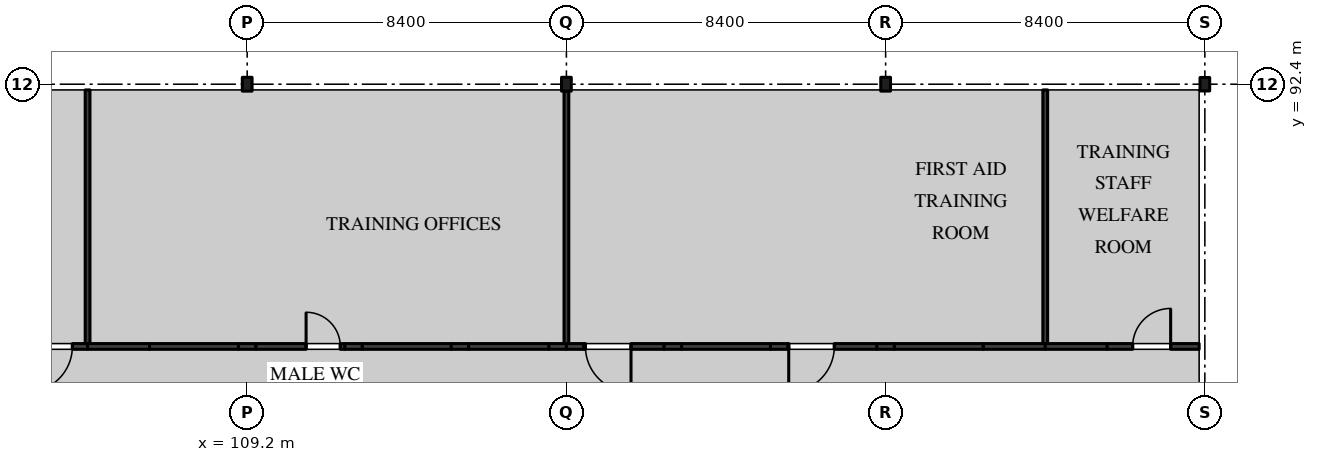
"""IFC4 building model, lengths in metres.
Left out: names, types, materials, properties, quantities, classifications, styles, units other than length and angle.
Written with IfcOpenShell. Run it as: python <this file> out.ifc"""

import sys

from ifc_helpers import new_model, si_unit, direction, frame, frame_2d, origin, origin_2d, place, context, subcontext, project, spatial, rectangle, i_section, extrude, element, fill, save


model = new_model("IFC4")
c1 = context("Model", 3, precision=1e-05, world=origin(), true_north=direction((0.0, 1.0)))
c2 = subcontext(c1, "Body", "Model", "MODEL_VIEW")
j1 = project(units=[si_unit("LENGTHUNIT", "METRE"), si_unit("PLANEANGLEUNIT", "RADIAN")], contexts=[c1])
p1 = place(None, origin())
s1 = spatial("IfcSite", under=j1, at=p1, CompositionType="ELEMENT")
p2 = place(p1, origin())
s2 = spatial("IfcBuilding", under=s1, at=p2, CompositionType="ELEMENT")
p3 = place(p2, frame((0.0, 0.0, 18.9)))
s3 = spatial("IfcBuildingStorey", under=s2, at=p3, CompositionType="ELEMENT", Elevation=18.9)
for number, where, z_axis, x_axis in (
    (1, (109.2, 92.4, 0.0), (0.0, 0.0, 1.0), (1.0, 0.0, 0.0)),
    (2, (117.6, 92.4, 0.0), (0.0, 0.0, 1.0), (1.0, 0.0, 0.0)),
    (3, (126.0, 92.4, 0.0), (0.0, 0.0, 1.0), (1.0, 0.0, 0.0)),
):
    element("IfcColumn", number, at=place(p3, frame(where, z_axis=z_axis, x_axis=x_axis)), inside=s3, PredefinedType="COLUMN", context=c2, shape_type="SweptSolid", body=[
        extrude(i_section(OverallWidth=0.257, OverallDepth=0.363, WebThickness=0.013, FlangeThickness=0.022, FilletRadius=0.015, at=origin_2d()), origin(), (0.0, 0.0, 1.0), 4.37),
    ])
p4 = place(p3, frame((134.4, 92.4, 0.0), z_axis=(0.0, 0.0, 1.0), x_axis=(1.0, 0.0, 0.0)))
e4 = element("IfcColumn", 4, at=p4, inside=s3, PredefinedType="COLUMN", context=c2, shape_type="SweptSolid", body=[
    extrude(i_section(OverallWidth=0.254, OverallDepth=0.353, WebThickness=0.01, FlangeThickness=0.016, FilletRadius=0.015, at=origin_2d()), origin(), (0.0, 0.0, 1.0), 4.37),
])
p5 = place(p3, frame((105.0, 85.575, 0.0), z_axis=(0.0, 0.0, 1.0), x_axis=(0.0, 1.0, 0.0)))
e5 = element("IfcWall", 5, at=p5, inside=s3, PredefinedType="PARTITIONING", context=c2, shape_type="SweptSolid", body=[
    extrude(rectangle(XDim=6.675, YDim=0.125, at=frame_2d((3.337, 0.0))), origin(), (0.0, 0.0, 1.0), 4.37),
])
p6 = place(p3, frame((103.37, 85.5, 0.0), z_axis=(0.0, 0.0, 1.0), x_axis=(1.0, 0.0, 0.0)))
e6 = element("IfcWall", 6, at=p6, inside=s3, PredefinedType="PARTITIONING", context=c2, shape_type="SweptSolid", body=[
    extrude(rectangle(XDim=1.63, YDim=0.15, at=frame_2d((0.815, 0.0))), origin(), (0.0, 0.0, 1.0), 3.946),
])
p7 = place(p6, frame((0.03, 0.0, 0.0)))
e7 = element("IfcOpeningElement", 7, at=p7, cuts=e6, PredefinedType="OPENING", context=c2, shape_type="SweptSolid", body=[
    extrude(rectangle(XDim=1.2, YDim=2.4, at=frame_2d((0.6, 1.2))), frame((0.0, 0.085, 0.0), z_axis=(0.0, -1.0, 0.0), x_axis=(1.0, 0.0, 0.0)), (0.0, 0.0, 1.0), 0.17),
])
p8 = place(p3, frame((117.6, 85.575, 0.0), z_axis=(0.0, 0.0, 1.0), x_axis=(0.0, 1.0, 0.0)))
e8 = element("IfcWall", 8, at=p8, inside=s3, PredefinedType="PARTITIONING", context=c2, shape_type="SweptSolid", body=[
    extrude(rectangle(XDim=6.644, YDim=0.125, at=frame_2d((3.322, 0.0))), origin(), (0.0, 0.0, 1.0), 3.819),
])
p9 = place(p3, frame((105.0, 85.5, 0.0), z_axis=(0.0, 0.0, 1.0), x_axis=(1.0, 0.0, 0.0)))
e9 = element("IfcWall", 9, at=p9, inside=s3, PredefinedType="PARTITIONING", context=c2, shape_type="SweptSolid", body=[
    extrude(rectangle(XDim=1.63, YDim=0.15, at=frame_2d((0.815, 0.0))), origin(), (0.0, 0.0, 1.0), 3.946),
])
p10 = place(p3, frame((106.63, 85.5, 0.0), z_axis=(0.0, 0.0, 1.0), x_axis=(1.0, 0.0, 0.0)))
e10 = element("IfcWall", 10, at=p10, inside=s3, PredefinedType="PARTITIONING", context=c2, shape_type="SweptSolid", body=[
    extrude(rectangle(XDim=2.34, YDim=0.15, at=frame_2d((1.17, 0.0))), origin(), (0.0, 0.0, 1.0), 4.37),
])
p11 = place(p3, frame((108.97, 85.5, 0.0), z_axis=(0.0, 0.0, 1.0), x_axis=(1.0, 0.0, 0.0)))
e11 = element("IfcWall", 11, at=p11, inside=s3, PredefinedType="PARTITIONING", context=c2, shape_type="SweptSolid", body=[
    extrude(rectangle(XDim=0.46, YDim=0.15, at=frame_2d((0.23, 0.0))), origin(), (0.0, 0.0, 1.0), 3.819),
])
p12 = place(p3, frame((109.43, 85.5, 0.0), z_axis=(0.0, 0.0, 1.0), x_axis=(1.0, 0.0, 0.0)))
e12 = element("IfcWall", 12, at=p12, inside=s3, PredefinedType="PARTITIONING", context=c2, shape_type="SweptSolid", body=[
    extrude(rectangle(XDim=2.34, YDim=0.15, at=frame_2d((1.17, 0.0))), origin(), (0.0, 0.0, 1.0), 4.37),
])
p13 = place(p12, frame((1.32, 0.0, 0.0)))
e13 = element("IfcOpeningElement", 13, at=p13, cuts=e12, PredefinedType="OPENING", context=c2, shape_type="SweptSolid", body=[
    extrude(rectangle(XDim=0.9, YDim=2.1, at=frame_2d((0.45, 1.05))), frame((0.0, 0.085, 0.0), z_axis=(0.0, -1.0, 0.0), x_axis=(1.0, 0.0, 0.0)), (0.0, 0.0, 1.0), 0.17),
])
p14 = place(p3, frame((111.77, 85.5, 0.0), z_axis=(0.0, 0.0, 1.0), x_axis=(1.0, 0.0, 0.0)))
e14 = element("IfcWall", 14, at=p14, inside=s3, PredefinedType="PARTITIONING", context=c2, shape_type="SweptSolid", body=[
    extrude(rectangle(XDim=0.46, YDim=0.15, at=frame_2d((0.23, 0.0))), origin(), (0.0, 0.0, 1.0), 3.946),
])
p15 = place(p3, frame((112.23, 85.5, 0.0), z_axis=(0.0, 0.0, 1.0), x_axis=(1.0, 0.0, 0.0)))
e15 = element("IfcWall", 15, at=p15, inside=s3, PredefinedType="PARTITIONING", context=c2, shape_type="SweptSolid", body=[
    extrude(rectangle(XDim=2.34, YDim=0.15, at=frame_2d((1.17, 0.0))), origin(), (0.0, 0.0, 1.0), 4.37),
])
p16 = place(p3, frame((114.57, 85.5, 0.0), z_axis=(0.0, 0.0, 1.0), x_axis=(1.0, 0.0, 0.0)))
e16 = element("IfcWall", 16, at=p16, inside=s3, PredefinedType="PARTITIONING", context=c2, shape_type="SweptSolid", body=[
    extrude(rectangle(XDim=0.46, YDim=0.15, at=frame_2d((0.23, 0.0))), origin(), (0.0, 0.0, 1.0), 3.946),
])
p17 = place(p3, frame((115.03, 85.5, 0.0), z_axis=(0.0, 0.0, 1.0), x_axis=(1.0, 0.0, 0.0)))
e17 = element("IfcWall", 17, at=p17, inside=s3, PredefinedType="PARTITIONING", context=c2, shape_type="SweptSolid", body=[
    extrude(rectangle(XDim=2.11, YDim=0.15, at=frame_2d((1.055, 0.0))), origin(), (0.0, 0.0, 1.0), 4.37),
])
p18 = place(p3, frame((117.14, 85.5, 0.0), z_axis=(0.0, 0.0, 1.0), x_axis=(1.0, 0.0, 0.0)))
e18 = element("IfcWall", 18, at=p18, inside=s3, PredefinedType="PARTITIONING", context=c2, shape_type="SweptSolid", body=[
    extrude(rectangle(XDim=0.46, YDim=0.15, at=frame_2d((0.23, 0.0))), origin(), (0.0, 0.0, 1.0), 3.819),
])
p19 = place(p3, frame((130.2, 85.575, 0.0), z_axis=(0.0, 0.0, 1.0), x_axis=(0.0, 1.0, 0.0)))
e19 = element("IfcWall", 19, at=p19, inside=s3, PredefinedType="PARTITIONING", context=c2, shape_type="SweptSolid", body=[
    extrude(rectangle(XDim=6.675, YDim=0.125, at=frame_2d((3.337, 0.0))), origin(), (0.0, 0.0, 1.0), 4.37),
])
p20 = place(p3, frame((117.6, 85.5, 0.0), z_axis=(0.0, 0.0, 1.0), x_axis=(1.0, 0.0, 0.0)))
e20 = element("IfcWall", 20, at=p20, inside=s3, PredefinedType="PARTITIONING", context=c2, shape_type="SweptSolid", body=[
    extrude(rectangle(XDim=0.46, YDim=0.15, at=frame_2d((0.23, 0.0))), origin(), (0.0, 0.0, 1.0), 3.819),
])
p21 = place(p3, frame((118.06, 85.5, 0.0), z_axis=(0.0, 0.0, 1.0), x_axis=(1.0, 0.0, 0.0)))
e21 = element("IfcWall", 21, at=p21, inside=s3, PredefinedType="PARTITIONING", context=c2, shape_type="SweptSolid", body=[
    extrude(rectangle(XDim=2.11, YDim=0.15, at=frame_2d((1.055, 0.0))), origin(), (0.0, 0.0, 1.0), 4.37),
])
p22 = place(p21, frame((0.04, 0.0, 0.0)))
e22 = element("IfcOpeningElement", 22, at=p22, cuts=e21, PredefinedType="OPENING", context=c2, shape_type="SweptSolid", body=[
    extrude(rectangle(XDim=1.2, YDim=2.4, at=frame_2d((0.6, 1.2))), frame((0.0, 0.085, 0.0), z_axis=(0.0, -1.0, 0.0), x_axis=(1.0, 0.0, 0.0)), (0.0, 0.0, 1.0), 0.17),
])
p23 = place(p3, frame((120.17, 85.5, 0.0), z_axis=(0.0, 0.0, 1.0), x_axis=(1.0, 0.0, 0.0)))
e23 = element("IfcWall", 23, at=p23, inside=s3, PredefinedType="PARTITIONING", context=c2, shape_type="SweptSolid", body=[
    extrude(rectangle(XDim=0.46, YDim=0.15, at=frame_2d((0.23, 0.0))), origin(), (0.0, 0.0, 1.0), 3.946),
])
p24 = place(p3, frame((120.63, 85.5, 0.0), z_axis=(0.0, 0.0, 1.0), x_axis=(1.0, 0.0, 0.0)))
e24 = element("IfcWall", 24, at=p24, inside=s3, PredefinedType="PARTITIONING", context=c2, shape_type="SweptSolid", body=[
    extrude(rectangle(XDim=2.34, YDim=0.15, at=frame_2d((1.17, 0.0))), origin(), (0.0, 0.0, 1.0), 4.37),
])
p25 = place(p3, frame((122.97, 85.5, 0.0), z_axis=(0.0, 0.0, 1.0), x_axis=(1.0, 0.0, 0.0)))
e25 = element("IfcWall", 25, at=p25, inside=s3, PredefinedType="PARTITIONING", context=c2, shape_type="SweptSolid", body=[
    extrude(rectangle(XDim=0.46, YDim=0.15, at=frame_2d((0.23, 0.0))), origin(), (0.0, 0.0, 1.0), 3.946),
])
p26 = place(p3, frame((123.43, 85.5, 0.0), z_axis=(0.0, 0.0, 1.0), x_axis=(1.0, 0.0, 0.0)))
e26 = element("IfcWall", 26, at=p26, inside=s3, PredefinedType="PARTITIONING", context=c2, shape_type="SweptSolid", body=[
    extrude(rectangle(XDim=2.34, YDim=0.15, at=frame_2d((1.17, 0.0))), origin(), (0.0, 0.0, 1.0), 4.37),
])
p27 = place(p26, frame((0.02, 0.0, 0.0)))
e27 = element("IfcOpeningElement", 27, at=p27, cuts=e26, PredefinedType="OPENING", context=c2, shape_type="SweptSolid", body=[
    extrude(rectangle(XDim=1.2, YDim=2.4, at=frame_2d((0.6, 1.2))), frame((0.0, 0.085, 0.0), z_axis=(0.0, -1.0, 0.0), x_axis=(1.0, 0.0, 0.0)), (0.0, 0.0, 1.0), 0.17),
])
p28 = place(p3, frame((125.77, 85.5, 0.0), z_axis=(0.0, 0.0, 1.0), x_axis=(1.0, 0.0, 0.0)))
e28 = element("IfcWall", 28, at=p28, inside=s3, PredefinedType="PARTITIONING", context=c2, shape_type="SweptSolid", body=[
    extrude(rectangle(XDim=0.46, YDim=0.15, at=frame_2d((0.23, 0.0))), origin(), (0.0, 0.0, 1.0), 3.819),
])
p29 = place(p3, frame((126.23, 85.5, 0.0), z_axis=(0.0, 0.0, 1.0), x_axis=(1.0, 0.0, 0.0)))
e29 = element("IfcWall", 29, at=p29, inside=s3, PredefinedType="PARTITIONING", context=c2, shape_type="SweptSolid", body=[
    extrude(rectangle(XDim=2.34, YDim=0.15, at=frame_2d((1.17, 0.0))), origin(), (0.0, 0.0, 1.0), 4.37),
])
p30 = place(p3, frame((128.57, 85.5, 0.0), z_axis=(0.0, 0.0, 1.0), x_axis=(1.0, 0.0, 0.0)))
e30 = element("IfcWall", 30, at=p30, inside=s3, PredefinedType="PARTITIONING", context=c2, shape_type="SweptSolid", body=[
    extrude(rectangle(XDim=1.63, YDim=0.15, at=frame_2d((0.815, 0.0))), origin(), (0.0, 0.0, 1.0), 3.946),
])
p31 = place(p3, frame((130.2, 85.5, 0.0), z_axis=(0.0, 0.0, 1.0), x_axis=(1.0, 0.0, 0.0)))
e31 = element("IfcWall", 31, at=p31, inside=s3, PredefinedType="PARTITIONING", context=c2, shape_type="SweptSolid", body=[
    extrude(rectangle(XDim=1.63, YDim=0.15, at=frame_2d((0.815, 0.0))), origin(), (0.0, 0.0, 1.0), 3.946),
])
p32 = place(p3, frame((131.83, 85.5, 0.0), z_axis=(0.0, 0.0, 1.0), x_axis=(1.0, 0.0, 0.0)))
e32 = element("IfcWall", 32, at=p32, inside=s3, PredefinedType="PARTITIONING", context=c2, shape_type="SweptSolid", body=[
    extrude(rectangle(XDim=2.42, YDim=0.15, at=frame_2d((1.21, 0.0))), origin(), (0.0, 0.0, 1.0), 4.37),
])
p33 = place(p32, frame((0.67, 0.0, 0.0)))
e33 = element("IfcOpeningElement", 33, at=p33, cuts=e32, PredefinedType="OPENING", context=c2, shape_type="SweptSolid", body=[
    extrude(rectangle(XDim=1.0, YDim=2.1, at=frame_2d((0.5, 1.05))), frame((0.0, 0.085, 0.0), z_axis=(0.0, -1.0, 0.0), x_axis=(1.0, 0.0, 0.0)), (0.0, 0.0, 1.0), 0.17),
])
p34 = place(p7, frame((1.2, 0.0, 0.0), z_axis=(0.0, 0.0, 1.0), x_axis=(-1.0, 0.0, 0.0)))
e34 = element("IfcDoor", 34, at=p34, inside=s3, OperationType="SINGLE_SWING_LEFT", PredefinedType="DOOR", context=c2, shape_type="SweptSolid", body=[
    extrude(rectangle(XDim=1.2, YDim=2.4, at=frame_2d((0.6, 1.2))), frame((0.0, 0.025, 0.0), z_axis=(0.0, -1.0, 0.0), x_axis=(1.0, 0.0, 0.0)), (0.0, 0.0, 1.0), 0.05),
])
fill(e7, e34)
p35 = place(p13, origin())
e35 = element("IfcDoor", 35, at=p35, inside=s3, OperationType="SINGLE_SWING_RIGHT", PredefinedType="DOOR", context=c2, shape_type="SweptSolid", body=[
    extrude(rectangle(XDim=0.9, YDim=2.1, at=frame_2d((0.45, 1.05))), frame((0.0, 0.025, 0.0), z_axis=(0.0, -1.0, 0.0), x_axis=(1.0, 0.0, 0.0)), (0.0, 0.0, 1.0), 0.05),
])
fill(e13, e35)
p36 = place(p22, frame((1.2, 0.0, 0.0), z_axis=(0.0, 0.0, 1.0), x_axis=(-1.0, 0.0, 0.0)))
e36 = element("IfcDoor", 36, at=p36, inside=s3, OperationType="SINGLE_SWING_RIGHT", PredefinedType="DOOR", context=c2, shape_type="SweptSolid", body=[
    extrude(rectangle(XDim=1.2, YDim=2.4, at=frame_2d((0.6, 1.2))), frame((0.0, 0.025, 0.0), z_axis=(0.0, -1.0, 0.0), x_axis=(1.0, 0.0, 0.0)), (0.0, 0.0, 1.0), 0.05),
])
fill(e22, e36)
p37 = place(p27, frame((1.2, 0.0, 0.0), z_axis=(0.0, 0.0, 1.0), x_axis=(-1.0, 0.0, 0.0)))
e37 = element("IfcDoor", 37, at=p37, inside=s3, OperationType="SINGLE_SWING_LEFT", PredefinedType="DOOR", context=c2, shape_type="SweptSolid", body=[
    extrude(rectangle(XDim=1.2, YDim=2.4, at=frame_2d((0.6, 1.2))), frame((0.0, 0.025, 0.0), z_axis=(0.0, -1.0, 0.0), x_axis=(1.0, 0.0, 0.0)), (0.0, 0.0, 1.0), 0.05),
])
fill(e27, e37)
p38 = place(p33, origin())
e38 = element("IfcDoor", 38, at=p38, inside=s3, OperationType="SINGLE_SWING_LEFT", PredefinedType="DOOR", context=c2, shape_type="SweptSolid", body=[
    extrude(rectangle(XDim=1.0, YDim=2.1, at=frame_2d((0.5, 1.05))), frame((0.0, 0.025, 0.0), z_axis=(0.0, -1.0, 0.0), x_axis=(1.0, 0.0, 0.0)), (0.0, 0.0, 1.0), 0.05),
])
fill(e33, e38)
save(model, sys.argv[1])
